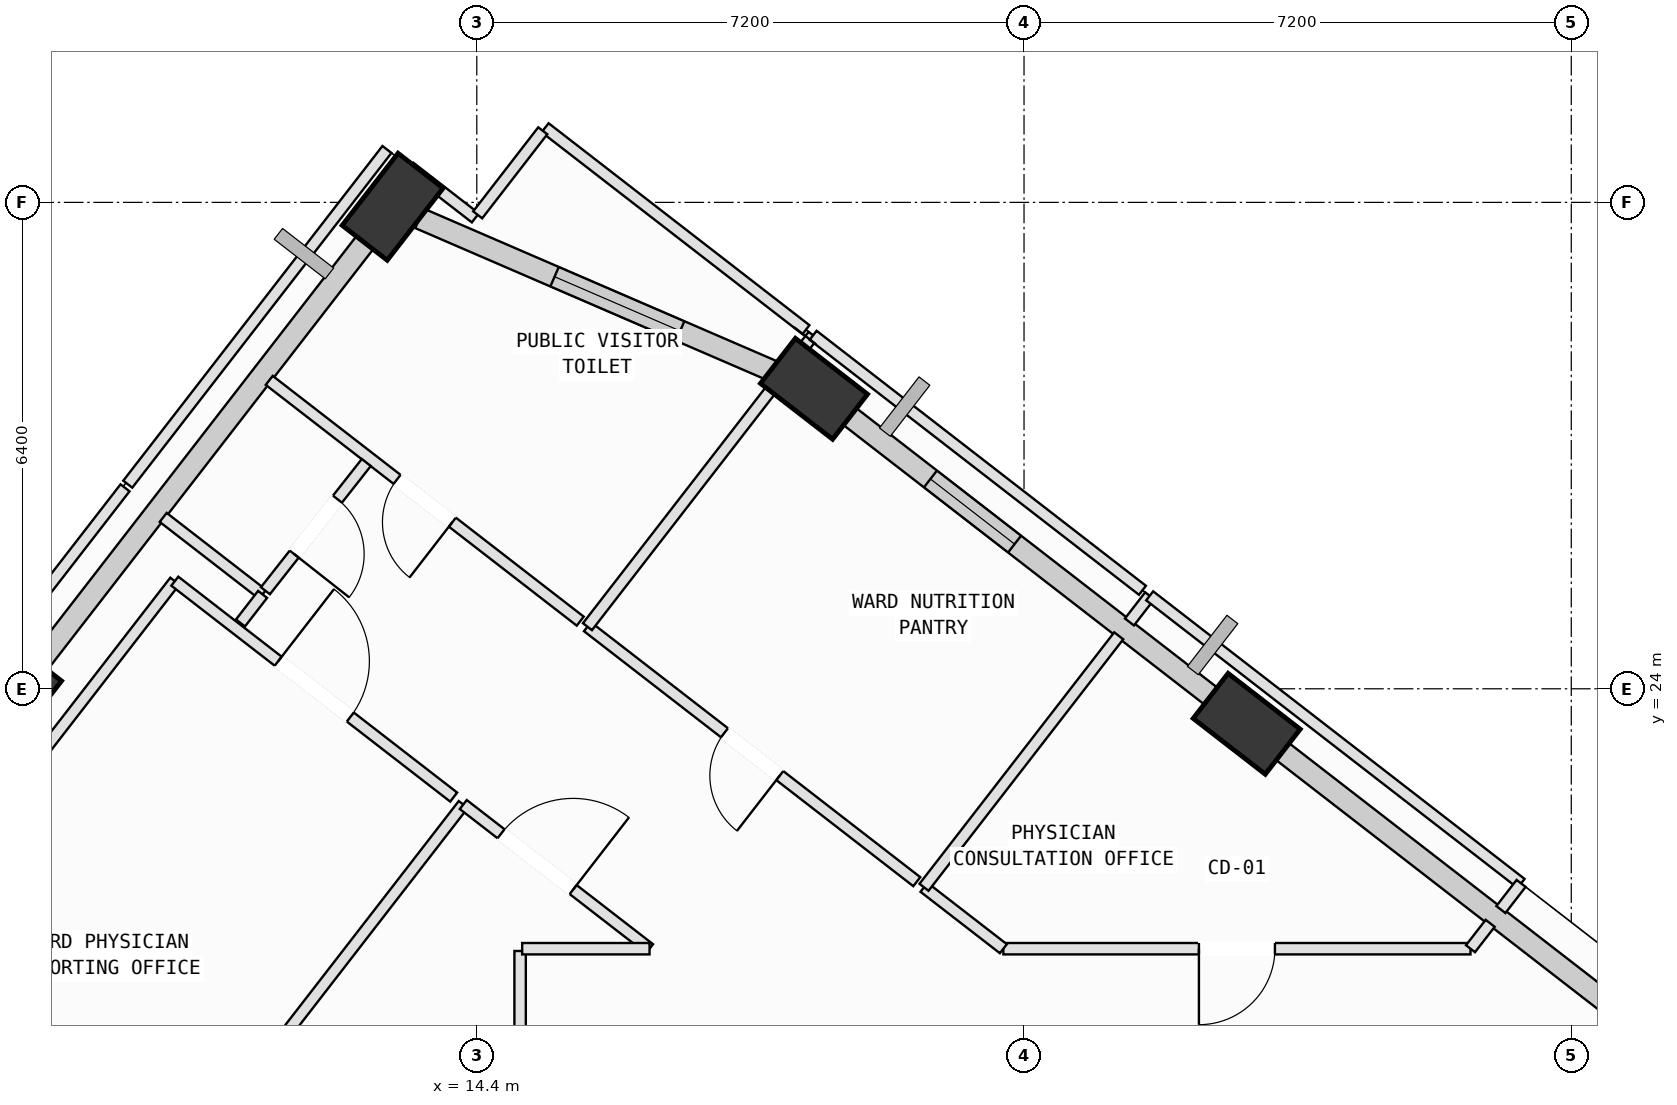
"""IFC4 building model, lengths in metres.
Left out: names, types, materials, properties, quantities, classifications, styles, units other than length and angle.
Written with IfcOpenShell. Run it as: python <this file> out.ifc"""

import sys

from ifc_helpers import new_model, si_unit, direction, frame, frame_2d, origin, origin_2d, place, context, subcontext, project, spatial, rectangle, extrude, element, fill, save


model = new_model("IFC4")
c1 = context("Model", 3, precision=1e-05, world=origin(), true_north=direction((0.0, 1.0)))
c2 = subcontext(c1, "Body", "Model", "MODEL_VIEW")
j1 = project(units=[si_unit("LENGTHUNIT", "METRE"), si_unit("PLANEANGLEUNIT", "RADIAN")], contexts=[c1])
p1 = place(None, origin())
s1 = spatial("IfcSite", under=j1, at=p1, CompositionType="ELEMENT")
p2 = place(p1, origin())
s2 = spatial("IfcBuilding", under=s1, at=p2, CompositionType="ELEMENT")
p3 = place(p2, frame((0.0, 0.0, 247.2)))
s3 = spatial("IfcBuildingStorey", under=s2, at=p3, CompositionType="ELEMENT", Elevation=247.2)
p4 = place(p3, frame((24.53, 23.539, 0.002), z_axis=(0.005555283631, -0.037543949814, 0.999279535794), x_axis=(-0.871721329071, 0.489450758115, 0.023235314142)))
e1 = element("IfcColumn", 1, at=p4, inside=s3, PredefinedType="COLUMN", context=c2, shape_type="SweptSolid", body=[
    extrude(rectangle(XDim=1.2, YDim=0.75, at=origin_2d()), origin(), (0.0, 0.0, 1.0), 3.999),
])
p5 = place(p3, frame((18.837, 27.947, 0.002), z_axis=(-0.012560214296, -0.0611548298, 0.998049261214), x_axis=(-0.651594320374, 0.757604088657, 0.03822154505)))
e2 = element("IfcColumn", 2, at=p5, inside=s3, PredefinedType="COLUMN", context=c2, shape_type="SweptSolid", body=[
    extrude(rectangle(XDim=1.2, YDim=0.75, at=origin_2d()), origin(), (0.0, 0.0, 1.0), 4.004),
])
p6 = place(p3, frame((13.293, 30.343, 0.002), z_axis=(-0.022213828305, -0.084047388737, 0.996214124713), x_axis=(0.793170432052, 0.605108125641, 0.068737340657)))
e3 = element("IfcColumn", 3, at=p6, inside=s3, PredefinedType="COLUMN", context=c2, shape_type="SweptSolid", body=[
    extrude(rectangle(XDim=1.2, YDim=0.75, at=origin_2d()), origin(), (0.0, 0.0, 1.0), 4.011),
])
p7 = place(p3, frame((8.272, 23.859, 0.002), z_axis=(0.00479977683, -0.104379956889, 0.994525910543), x_axis=(0.575449404971, 0.813653503986, 0.082619354686)))
e4 = element("IfcColumn", 4, at=p7, inside=s3, PredefinedType="COLUMN", context=c2, shape_type="SweptSolid", body=[
    extrude(rectangle(XDim=1.2, YDim=0.75, at=origin_2d()), origin(), (0.0, 0.0, 1.0), 4.018),
])
p8 = place(p3, frame((24.885, 23.264, 0.0), z_axis=(0.0, 0.0, 1.0), x_axis=(0.790684257093, -0.612224146523, 0.0)))
e5 = element("IfcWall", 5, at=p8, inside=s3, PredefinedType="SOLIDWALL", context=c2, shape_type="SweptSolid", body=[
    extrude(rectangle(XDim=6.958, YDim=0.28, at=frame_2d((3.479, 0.0))), origin(), (0.0, 0.0, 1.0), 3.165),
])
p9 = place(p3, frame((19.182, 27.68, 0.0), z_axis=(0.0, 0.0, 1.0), x_axis=(0.790688693492, -0.612218416893, 0.0)))
e6 = element("IfcWall", 6, at=p9, inside=s3, PredefinedType="SOLIDWALL", context=c2, shape_type="SweptSolid", body=[
    extrude(rectangle(XDim=6.424, YDim=0.28, at=frame_2d((3.212, 0.0))), origin(), (0.0, 0.0, 1.0), 3.265),
])
p10 = place(p9, frame((1.501, 0.0, 0.75)))
e7 = element("IfcOpeningElement", 7, at=p10, cuts=e6, PredefinedType="OPENING", context=c2, shape_type="SweptSolid", body=[
    extrude(rectangle(XDim=1.4, YDim=1.85, at=frame_2d((0.7, 0.925))), frame((0.0, 0.15, 0.0), z_axis=(0.0, -1.0, 0.0), x_axis=(1.0, 0.0, 0.0)), (0.0, 0.0, 1.0), 0.3),
])
p11 = place(p3, frame((13.646, 30.19, 0.0), z_axis=(0.0, 0.0, 1.0), x_axis=(0.917964446045, -0.396662672553, 0.0)))
e8 = element("IfcWall", 8, at=p11, inside=s3, PredefinedType="SOLIDWALL", context=c2, shape_type="SweptSolid", body=[
    extrude(rectangle(XDim=5.302, YDim=0.28, at=frame_2d((2.651, 0.0))), origin(), (0.0, 0.0, 1.0), 3.265),
])
p12 = place(p11, frame((1.937, 0.0, 0.75)))
e9 = element("IfcOpeningElement", 9, at=p12, cuts=e8, PredefinedType="OPENING", context=c2, shape_type="SweptSolid", body=[
    extrude(rectangle(XDim=1.8, YDim=2.05, at=frame_2d((0.9, 1.025))), frame((0.0, 0.15, 0.0), z_axis=(0.0, -1.0, 0.0), x_axis=(1.0, 0.0, 0.0)), (0.0, 0.0, 1.0), 0.3),
])
p13 = place(p3, frame((8.403, 24.028, 0.0), z_axis=(0.0, 0.0, 1.0), x_axis=(0.61220895988, 0.790696015826, 0.0)))
e10 = element("IfcWall", 10, at=p13, inside=s3, PredefinedType="SOLIDWALL", context=c2, shape_type="SweptSolid", body=[
    extrude(rectangle(XDim=7.434, YDim=0.28, at=frame_2d((3.717, 0.0))), origin(), (0.0, 0.0, 1.0), 3.265),
])
p14 = place(p3, frame((14.97, 20.55, 0.0), z_axis=(0.0, 0.0, 1.0), x_axis=(0.0, -1.0, 0.0)))
e11 = element("IfcWall", 11, at=p14, inside=s3, PredefinedType="PARTITIONING", context=c2, shape_type="SweptSolid", body=[
    extrude(rectangle(XDim=2.32, YDim=0.15, at=frame_2d((1.16, 0.0))), origin(), (0.0, 0.0, 1.0), 3.78),
])
p15 = place(p3, frame((5.874, 11.697, 0.0), z_axis=(0.0, 0.0, 1.0), x_axis=(0.612268172049, 0.790650166316, 0.0)))
e12 = element("IfcWall", 12, at=p15, inside=s3, PredefinedType="PARTITIONING", context=c2, shape_type="SweptSolid", body=[
    extrude(rectangle(XDim=13.634, YDim=0.15, at=frame_2d((6.817, 0.0))), origin(), (0.0, 0.0, 1.0), 3.78),
])
p16 = place(p3, frame((14.222, 22.477, 0.0), z_axis=(0.0, 0.0, 1.0), x_axis=(0.790834390633, -0.612030200719, 0.0)))
e13 = element("IfcWall", 13, at=p16, inside=s3, PredefinedType="PARTITIONING", context=c2, shape_type="SweptSolid", body=[
    extrude(rectangle(XDim=3.099, YDim=0.15, at=frame_2d((1.55, 0.0))), origin(), (0.0, 0.0, 1.0), 3.78),
])
p17 = place(p16, frame((0.628, 0.0, 0.0)))
e14 = element("IfcOpeningElement", 14, at=p17, cuts=e13, PredefinedType="OPENING", context=c2, shape_type="SweptSolid", body=[
    extrude(rectangle(XDim=1.2, YDim=2.15, at=frame_2d((0.6, 1.075))), frame((0.0, 0.085, 0.0), z_axis=(0.0, -1.0, 0.0), x_axis=(1.0, 0.0, 0.0)), (0.0, 0.0, 1.0), 0.17),
])
p18 = place(p3, frame((16.673, 20.58, 0.0), z_axis=(0.0, 0.0, 1.0), x_axis=(-1.0, 0.0, 0.0)))
e15 = element("IfcWall", 15, at=p18, inside=s3, PredefinedType="PARTITIONING", context=c2, shape_type="SweptSolid", body=[
    extrude(rectangle(XDim=1.676, YDim=0.15, at=frame_2d((0.838, 0.0))), origin(), (0.0, 0.0, 1.0), 3.78),
])
p19 = place(p3, frame((3.608, 16.608, 0.0), z_axis=(0.0, 0.0, 1.0), x_axis=(0.612168330421, 0.790727472161, 0.0)))
e16 = element("IfcWall", 16, at=p19, inside=s3, PredefinedType="PARTITIONING", context=c2, shape_type="SweptSolid", body=[
    extrude(rectangle(XDim=11.139, YDim=0.15, at=frame_2d((5.57, 0.0))), origin(), (0.0, 0.0, 1.0), 3.265),
])
p20 = place(p3, frame((10.427, 25.416, 0.0), z_axis=(0.0, 0.0, 1.0), x_axis=(0.790662088337, -0.612252776283, 0.0)))
e17 = element("IfcWall", 17, at=p20, inside=s3, PredefinedType="PARTITIONING", context=c2, shape_type="SweptSolid", body=[
    extrude(rectangle(XDim=4.64, YDim=0.15, at=frame_2d((2.32, 0.0))), origin(), (0.0, 0.0, 1.0), 3.415),
])
p21 = place(p20, frame((1.72, 0.0, 0.0)))
e18 = element("IfcOpeningElement", 18, at=p21, cuts=e17, PredefinedType="OPENING", context=c2, shape_type="SweptSolid", body=[
    extrude(rectangle(XDim=1.2, YDim=2.15, at=frame_2d((0.6, 1.075))), frame((0.0, 0.085, 0.0), z_axis=(0.0, -1.0, 0.0), x_axis=(1.0, 0.0, 0.0)), (0.0, 0.0, 1.0), 0.17),
])
p22 = place(p3, frame((27.474, 20.58, 0.0), z_axis=(0.0, 0.0, 1.0), x_axis=(-1.0, 0.0, 0.0)))
e19 = element("IfcWall", 19, at=p22, inside=s3, PredefinedType="PARTITIONING", context=c2, shape_type="SweptSolid", body=[
    extrude(rectangle(XDim=6.146, YDim=0.15, at=frame_2d((3.073, 0.0))), origin(), (0.0, 0.0, 1.0), 3.415),
])
p23 = place(p22, frame((2.573, 0.0, 0.0)))
e20 = element("IfcOpeningElement", 20, at=p23, cuts=e19, PredefinedType="OPENING", context=c2, shape_type="SweptSolid", body=[
    extrude(rectangle(XDim=1.0, YDim=2.12, at=frame_2d((0.5, 1.06))), frame((0.0, 0.085, 0.0), z_axis=(0.0, -1.0, 0.0), x_axis=(1.0, 0.0, 0.0)), (0.0, 0.0, 1.0), 0.17),
])
p24 = place(p3, frame((21.328, 20.58, 0.0), z_axis=(0.0, 0.0, 1.0), x_axis=(-0.79085364938, 0.612005314733, 0.0)))
e21 = element("IfcWall", 21, at=p24, inside=s3, PredefinedType="PARTITIONING", context=c2, shape_type="SweptSolid", body=[
    extrude(rectangle(XDim=1.32, YDim=0.15, at=frame_2d((0.66, 0.0))), origin(), (0.0, 0.0, 1.0), 3.415),
])
p25 = place(p3, frame((20.284, 21.388, 0.0), z_axis=(0.0, 0.0, 1.0), x_axis=(0.612194371926, 0.790707310566, 0.0)))
e22 = element("IfcWall", 22, at=p25, inside=s3, PredefinedType="PARTITIONING", context=c2, shape_type="SweptSolid", body=[
    extrude(rectangle(XDim=4.185, YDim=0.15, at=frame_2d((2.093, 0.0))), origin(), (0.0, 0.0, 1.0), 3.78),
])
p26 = place(p3, frame((22.987, 24.879, 0.0), z_axis=(0.0, 0.0, 1.0), x_axis=(0.611527407978, 0.791223248706, 0.0)))
e23 = element("IfcWall", 23, at=p26, inside=s3, PredefinedType="PARTITIONING", context=c2, shape_type="SweptSolid", body=[
    extrude(rectangle(XDim=0.435, YDim=0.15, at=frame_2d((0.217, 0.0))), origin(), (0.0, 0.0, 1.0), 3.78),
])
p27 = place(p3, frame((23.253, 25.223, 0.0), z_axis=(0.0, 0.0, 1.0), x_axis=(0.790686081484, -0.612221790324, 0.0)))
e24 = element("IfcWall", 24, at=p27, inside=s3, PredefinedType="PARTITIONING", context=c2, shape_type="SweptSolid", body=[
    extrude(rectangle(XDim=6.181, YDim=0.15, at=frame_2d((3.09, 0.0))), origin(), (0.0, 0.0, 1.0), 3.78),
])
p28 = place(p3, frame((28.14, 21.439, 0.0), z_axis=(0.0, 0.0, 1.0), x_axis=(-0.611527407978, -0.791223248706, 0.0)))
e25 = element("IfcWall", 25, at=p28, inside=s3, PredefinedType="PARTITIONING", context=c2, shape_type="SweptSolid", body=[
    extrude(rectangle(XDim=0.435, YDim=0.15, at=frame_2d((0.217, 0.0))), origin(), (0.0, 0.0, 1.0), 3.78),
])
p29 = place(p3, frame((27.733, 20.914, 0.0), z_axis=(0.0, 0.0, 1.0), x_axis=(-0.612499462373, -0.79047100427, 0.0)))
e26 = element("IfcWall", 26, at=p29, inside=s3, PredefinedType="PARTITIONING", context=c2, shape_type="SweptSolid", body=[
    extrude(rectangle(XDim=0.423, YDim=0.15, at=frame_2d((0.211, 0.0))), origin(), (0.0, 0.0, 1.0), 3.78),
])
p30 = place(p3, frame((20.189, 21.462, 0.0), z_axis=(0.0, 0.0, 1.0), x_axis=(-0.790688923612, 0.612218119691, 0.0)))
e27 = element("IfcWall", 27, at=p30, inside=s3, PredefinedType="PARTITIONING", context=c2, shape_type="SweptSolid", body=[
    extrude(rectangle(XDim=5.48, YDim=0.15, at=frame_2d((2.74, 0.0))), origin(), (0.0, 0.0, 1.0), 3.415),
])
p31 = place(p30, frame((2.28, 0.0, 0.0)))
e28 = element("IfcOpeningElement", 28, at=p31, cuts=e27, PredefinedType="OPENING", context=c2, shape_type="SweptSolid", body=[
    extrude(rectangle(XDim=0.92, YDim=2.1, at=frame_2d((0.46, 1.05))), frame((0.0, 0.085, 0.0), z_axis=(0.0, -1.0, 0.0), x_axis=(1.0, 0.0, 0.0)), (0.0, 0.0, 1.0), 0.17),
])
p32 = place(p3, frame((15.856, 24.817, 0.0), z_axis=(0.0, 0.0, 1.0), x_axis=(0.612343855501, 0.790591552339, 0.0)))
e29 = element("IfcWall", 29, at=p32, inside=s3, PredefinedType="PARTITIONING", context=c2, shape_type="SweptSolid", body=[
    extrude(rectangle(XDim=4.068, YDim=0.15, at=frame_2d((2.034, 0.0))), origin(), (0.0, 0.0, 1.0), 3.78),
])
p33 = place(p3, frame((18.492, 28.221, 0.0), z_axis=(0.0, 0.0, 1.0), x_axis=(0.61235427183, 0.790583484378, 0.0)))
e30 = element("IfcWall", 30, at=p33, inside=s3, PredefinedType="PARTITIONING", context=c2, shape_type="SweptSolid", body=[
    extrude(rectangle(XDim=0.544, YDim=0.15, at=frame_2d((0.272, 0.0))), origin(), (0.0, 0.0, 1.0), 3.78),
])
p34 = place(p3, frame((18.825, 28.651, 0.0), z_axis=(0.0, 0.0, 1.0), x_axis=(0.790688923612, -0.612218119691, 0.0)))
e31 = element("IfcWall", 31, at=p34, inside=s3, PredefinedType="PARTITIONING", context=c2, shape_type="SweptSolid", body=[
    extrude(rectangle(XDim=5.48, YDim=0.15, at=frame_2d((2.74, 0.0))), origin(), (0.0, 0.0, 1.0), 3.78),
])
p35 = place(p3, frame((15.299, 31.382, 0.0), z_axis=(0.0, 0.0, 1.0), x_axis=(0.790719315849, -0.612178865646, 0.0)))
e32 = element("IfcWall", 32, at=p35, inside=s3, PredefinedType="PARTITIONING", context=c2, shape_type="SweptSolid", body=[
    extrude(rectangle(XDim=4.34, YDim=0.15, at=frame_2d((2.17, 0.0))), origin(), (0.0, 0.0, 1.0), 3.78),
])
p36 = place(p3, frame((15.761, 24.89, 0.0), z_axis=(0.0, 0.0, 1.0), x_axis=(-0.790706764685, 0.612195076983, 0.0)))
e33 = element("IfcWall", 33, at=p36, inside=s3, PredefinedType="PARTITIONING", context=c2, shape_type="SweptSolid", body=[
    extrude(rectangle(XDim=5.175, YDim=0.15, at=frame_2d((2.587, 0.0))), origin(), (0.0, 0.0, 1.0), 3.78),
])
p37 = place(p36, frame((2.127, 0.0, 0.0)))
e34 = element("IfcOpeningElement", 34, at=p37, cuts=e33, PredefinedType="OPENING", context=c2, shape_type="SweptSolid", body=[
    extrude(rectangle(XDim=0.92, YDim=2.1, at=frame_2d((0.46, 1.05))), frame((0.0, 0.085, 0.0), z_axis=(0.0, -1.0, 0.0), x_axis=(1.0, 0.0, 0.0)), (0.0, 0.0, 1.0), 0.17),
])
p38 = place(p3, frame((12.804, 30.022, 0.0), z_axis=(0.0, 0.0, 1.0), x_axis=(0.61211514576, 0.790768643998, 0.0)))
e35 = element("IfcWall", 35, at=p38, inside=s3, PredefinedType="PARTITIONING", context=c2, shape_type="SweptSolid", body=[
    extrude(rectangle(XDim=1.103, YDim=0.15, at=frame_2d((0.551, 0.0))), origin(), (0.0, 0.0, 1.0), 3.265),
])
p39 = place(p3, frame((13.519, 30.863, 0.0), z_axis=(0.0, 0.0, 1.0), x_axis=(0.790905545462, -0.611938247013, 0.0)))
e36 = element("IfcWall", 36, at=p39, inside=s3, PredefinedType="PARTITIONING", context=c2, shape_type="SweptSolid", body=[
    extrude(rectangle(XDim=1.09, YDim=0.15, at=frame_2d((0.545, 0.0))), origin(), (0.0, 0.0, 1.0), 3.78),
])
p40 = place(p3, frame((14.412, 30.236, 0.0), z_axis=(0.0, 0.0, 1.0), x_axis=(0.612053472181, 0.790816380199, 0.0)))
e37 = element("IfcWall", 37, at=p40, inside=s3, PredefinedType="PARTITIONING", context=c2, shape_type="SweptSolid", body=[
    extrude(rectangle(XDim=1.398, YDim=0.15, at=frame_2d((0.699, 0.0))), origin(), (0.0, 0.0, 1.0), 3.78),
])
p41 = place(p3, frame((6.257, 22.106, 0.0), z_axis=(0.0, 0.0, 1.0), x_axis=(0.612340459049, 0.790594183011, 0.0)))
e38 = element("IfcWall", 38, at=p41, inside=s3, PredefinedType="PARTITIONING", context=c2, shape_type="SweptSolid", body=[
    extrude(rectangle(XDim=5.74, YDim=0.15, at=frame_2d((2.87, 0.0))), origin(), (0.0, 0.0, 1.0), 3.78),
])
p42 = place(p3, frame((10.274, 26.255, 0.0), z_axis=(0.0, 0.0, 1.0), x_axis=(0.790661489403, -0.612253549745, 0.0)))
e39 = element("IfcWall", 39, at=p42, inside=s3, PredefinedType="PARTITIONING", context=c2, shape_type="SweptSolid", body=[
    extrude(rectangle(XDim=1.655, YDim=0.15, at=frame_2d((0.827, 0.0))), origin(), (0.0, 0.0, 1.0), 3.78),
])
p43 = place(p3, frame((11.582, 25.242, 0.0), z_axis=(0.0, 0.0, 1.0), x_axis=(-0.612090334944, -0.790787848837, 0.0)))
e40 = element("IfcWall", 40, at=p43, inside=s3, PredefinedType="PARTITIONING", context=c2, shape_type="SweptSolid", body=[
    extrude(rectangle(XDim=0.475, YDim=0.15, at=frame_2d((0.238, 0.0))), origin(), (0.0, 0.0, 1.0), 3.78),
])
p44 = place(p3, frame((12.946, 26.977, 0.0), z_axis=(0.0, 0.0, 1.0), x_axis=(-0.618293625279, -0.785947194753, 0.0)))
e41 = element("IfcWall", 41, at=p44, inside=s3, PredefinedType="PARTITIONING", context=c2, shape_type="SweptSolid", body=[
    extrude(rectangle(XDim=2.146, YDim=0.15, at=frame_2d((1.073, 0.0))), origin(), (0.0, 0.0, 1.0), 3.78),
])
p45 = place(p44, frame((0.613, 0.0, 0.0)))
e42 = element("IfcOpeningElement", 42, at=p45, cuts=e41, PredefinedType="OPENING", context=c2, shape_type="SweptSolid", body=[
    extrude(rectangle(XDim=0.92, YDim=2.1, at=frame_2d((0.46, 1.05))), frame((0.0, 0.085, 0.0), z_axis=(0.0, -1.0, 0.0), x_axis=(1.0, 0.0, 0.0)), (0.0, 0.0, 1.0), 0.17),
])
p46 = place(p3, frame((9.808, 26.692, 0.0), z_axis=(0.0, 0.0, 1.0), x_axis=(0.612209439056, 0.790695644816, 0.0)))
e43 = element("IfcWall", 43, at=p46, inside=s3, PredefinedType="PARTITIONING", context=c2, shape_type="SweptSolid", body=[
    extrude(rectangle(XDim=5.57, YDim=0.15, at=frame_2d((2.785, 0.0))), origin(), (0.0, 0.0, 1.0), 3.78),
])
p47 = place(p10, origin())
e44 = element("IfcWindow", 44, at=p47, inside=s3, PartitioningType="SINGLE_PANEL", PredefinedType="WINDOW", context=c2, shape_type="SweptSolid", body=[
    extrude(rectangle(XDim=1.4, YDim=1.85, at=frame_2d((0.7, 0.925))), frame((0.0, 0.03, 0.0), z_axis=(0.0, -1.0, 0.0), x_axis=(1.0, 0.0, 0.0)), (0.0, 0.0, 1.0), 0.06),
])
fill(e7, e44)
p48 = place(p12, origin())
e45 = element("IfcWindow", 45, at=p48, inside=s3, PartitioningType="SINGLE_PANEL", PredefinedType="WINDOW", context=c2, shape_type="SweptSolid", body=[
    extrude(rectangle(XDim=1.8, YDim=2.05, at=frame_2d((0.9, 1.025))), frame((0.0, 0.03, 0.0), z_axis=(0.0, -1.0, 0.0), x_axis=(1.0, 0.0, 0.0)), (0.0, 0.0, 1.0), 0.06),
])
fill(e9, e45)
p49 = place(p17, origin())
e46 = element("IfcDoor", 46, at=p49, inside=s3, OperationType="SINGLE_SWING_RIGHT", PredefinedType="DOOR", context=c2, shape_type="SweptSolid", body=[
    extrude(rectangle(XDim=1.2, YDim=2.15, at=frame_2d((0.6, 1.075))), frame((0.0, 0.025, 0.0), z_axis=(0.0, -1.0, 0.0), x_axis=(1.0, 0.0, 0.0)), (0.0, 0.0, 1.0), 0.05),
])
fill(e14, e46)
p50 = place(p21, origin())
e47 = element("IfcDoor", 47, at=p50, inside=s3, OperationType="SINGLE_SWING_LEFT", PredefinedType="DOOR", context=c2, shape_type="SweptSolid", body=[
    extrude(rectangle(XDim=1.2, YDim=2.15, at=frame_2d((0.6, 1.075))), frame((0.0, 0.025, 0.0), z_axis=(0.0, -1.0, 0.0), x_axis=(1.0, 0.0, 0.0)), (0.0, 0.0, 1.0), 0.05),
])
fill(e18, e47)
p51 = place(p23, origin())
e48 = element("IfcDoor", 48, at=p51, inside=s3, OperationType="SINGLE_SWING_RIGHT", PredefinedType="DOOR", context=c2, shape_type="SweptSolid", body=[
    extrude(rectangle(XDim=1.0, YDim=2.12, at=frame_2d((0.5, 1.06))), frame((0.0, 0.025, 0.0), z_axis=(0.0, -1.0, 0.0), x_axis=(1.0, 0.0, 0.0)), (0.0, 0.0, 1.0), 0.05),
])
fill(e20, e48)
p52 = place(p31, origin())
e49 = element("IfcDoor", 49, at=p52, inside=s3, OperationType="SINGLE_SWING_LEFT", PredefinedType="DOOR", context=c2, shape_type="SweptSolid", body=[
    extrude(rectangle(XDim=0.92, YDim=2.1, at=frame_2d((0.46, 1.05))), frame((0.0, 0.025, 0.0), z_axis=(0.0, -1.0, 0.0), x_axis=(1.0, 0.0, 0.0)), (0.0, 0.0, 1.0), 0.05),
])
fill(e28, e49)
p53 = place(p37, origin())
e50 = element("IfcDoor", 50, at=p53, inside=s3, OperationType="SINGLE_SWING_LEFT", PredefinedType="DOOR", context=c2, shape_type="SweptSolid", body=[
    extrude(rectangle(XDim=0.92, YDim=2.1, at=frame_2d((0.46, 1.05))), frame((0.0, 0.025, 0.0), z_axis=(0.0, -1.0, 0.0), x_axis=(1.0, 0.0, 0.0)), (0.0, 0.0, 1.0), 0.05),
])
fill(e34, e50)
p54 = place(p45, origin())
e51 = element("IfcDoor", 51, at=p54, inside=s3, OperationType="SINGLE_SWING_RIGHT", PredefinedType="DOOR", context=c2, shape_type="SweptSolid", body=[
    extrude(rectangle(XDim=0.92, YDim=2.1, at=frame_2d((0.46, 1.05))), frame((0.0, 0.025, 0.0), z_axis=(0.0, -1.0, 0.0), x_axis=(1.0, 0.0, 0.0)), (0.0, 0.0, 1.0), 0.05),
])
fill(e42, e51)
save(model, sys.argv[1])
